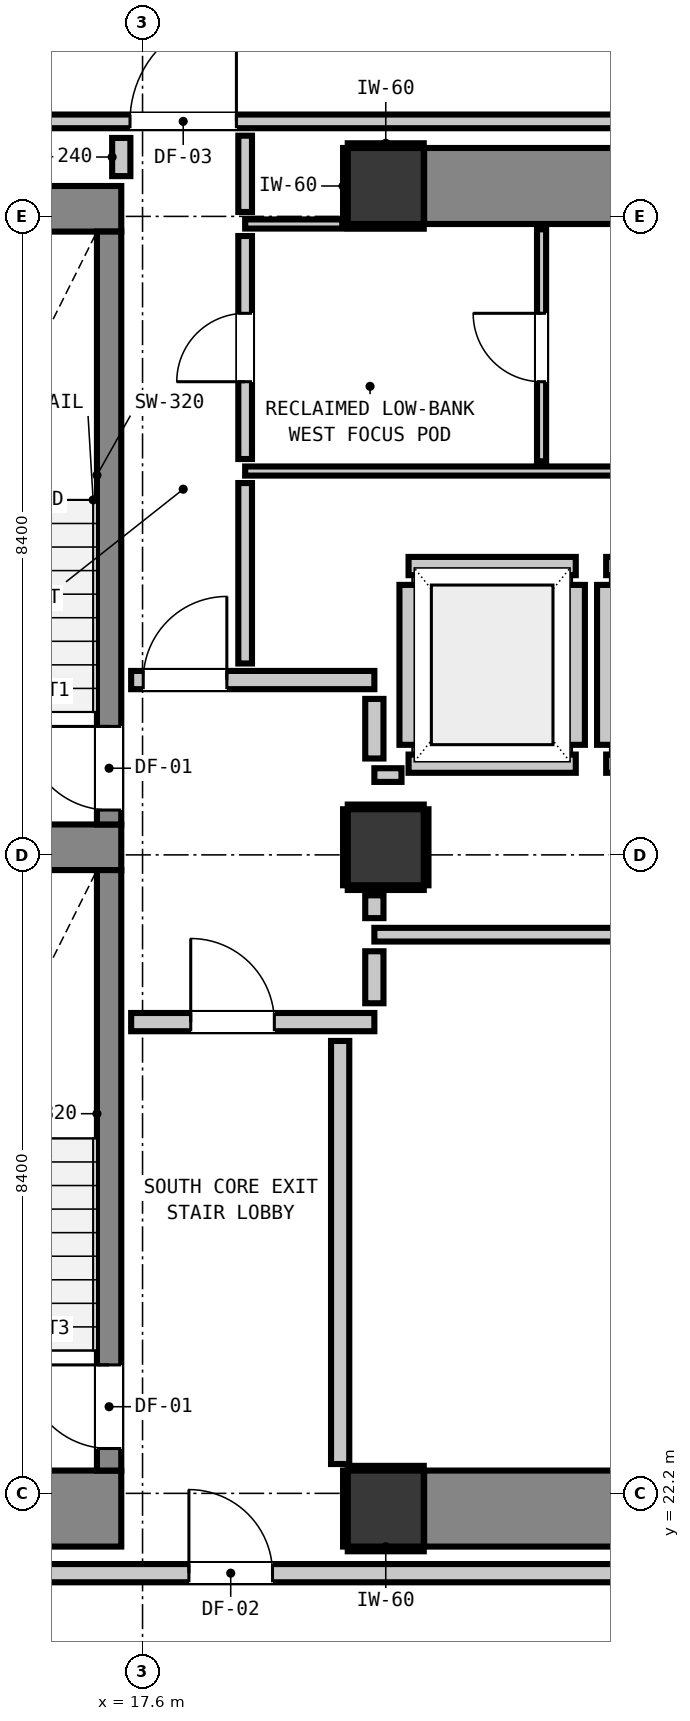
"""IFC4 building model, lengths in metres.
Left out: names, types, materials, properties, quantities, classifications, styles, units other than length and angle.
Written with IfcOpenShell. Run it as: python <this file> out.ifc"""

import sys

from ifc_helpers import new_model, si_unit, direction, frame, frame_2d, origin, origin_2d, place, context, subcontext, project, spatial, rectangle, extrude, element, fill, save


model = new_model("IFC4")
c1 = context("Model", 3, precision=1e-05, world=origin(), true_north=direction((0.0, 1.0)))
c2 = subcontext(c1, "Body", "Model", "MODEL_VIEW")
j1 = project(units=[si_unit("LENGTHUNIT", "METRE"), si_unit("PLANEANGLEUNIT", "RADIAN")], contexts=[c1])
p1 = place(None, origin())
s1 = spatial("IfcSite", under=j1, at=p1, CompositionType="ELEMENT")
p2 = place(p1, origin())
s2 = spatial("IfcBuilding", under=s1, at=p2, CompositionType="ELEMENT")
p3 = place(p2, frame((0.0, 0.0, 155.88)))
s3 = spatial("IfcBuildingStorey", under=s2, at=p3, CompositionType="ELEMENT", Elevation=155.88)
for number, where, z_axis, x_axis in (
    (1, (20.8, 22.0, 0.0), (0.0, 0.0, 1.0), (1.0, 0.0, 0.0)),
    (2, (20.8, 39.4, 0.0), (0.0, 0.0, 1.0), (1.0, 0.0, 0.0)),
):
    element("IfcColumn", number, at=place(p3, frame(where, z_axis=z_axis, x_axis=x_axis)), inside=s3, PredefinedType="COLUMN", context=c2, shape_type="SweptSolid", body=[
        extrude(rectangle(XDim=1.0, YDim=1.0, at=origin_2d()), origin(), (0.0, 0.0, 1.0), 3.32),
    ])
p4 = place(p3, frame((13.24, 22.0, 0.0), z_axis=(0.0, 0.0, 1.0), x_axis=(1.0, 0.0, 0.0)))
e3 = element("IfcWall", 3, at=p4, inside=s3, PredefinedType="SHEAR", context=c2, shape_type="SweptSolid", body=[
    extrude(rectangle(XDim=4.08, YDim=1.0, at=frame_2d((2.04, 0.0))), origin(), (0.0, 0.0, 1.0), 3.32),
])
p5 = place(p3, frame((13.24, 39.1, 0.0), z_axis=(0.0, 0.0, 1.0), x_axis=(1.0, 0.0, 0.0)))
e4 = element("IfcWall", 4, at=p5, inside=s3, PredefinedType="SHEAR", context=c2, shape_type="SweptSolid", body=[
    extrude(rectangle(XDim=4.08, YDim=0.6, at=frame_2d((2.04, 0.0))), origin(), (0.0, 0.0, 1.0), 3.32),
])
p6 = place(p3, frame((13.905, 30.7, 0.0), z_axis=(0.0, 0.0, 1.0), x_axis=(1.0, 0.0, 0.0)))
e5 = element("IfcWall", 5, at=p6, inside=s3, PredefinedType="SHEAR", context=c2, shape_type="SweptSolid", body=[
    extrude(rectangle(XDim=3.415, YDim=0.6, at=frame_2d((1.708, 0.0))), origin(), (0.0, 0.0, 1.0), 3.32),
])
for number, where, z_axis, x_axis in (
    (6, (21.305, 22.0, 0.0), (0.0, 0.0, 1.0), (1.0, 0.0, 0.0)),
    (7, (21.305, 39.4, 0.0), (0.0, 0.0, 1.0), (1.0, 0.0, 0.0)),
):
    element("IfcWall", number, at=place(p3, frame(where, z_axis=z_axis, x_axis=x_axis)), inside=s3, PredefinedType="SHEAR", context=c2, shape_type="SweptSolid", body=[
        extrude(rectangle(XDim=7.39, YDim=1.0, at=frame_2d((3.695, 0.0))), origin(), (0.0, 0.0, 1.0), 3.32),
    ])
p7 = place(p3, frame((17.16, 31.0, 0.0), z_axis=(0.0, 0.0, 1.0), x_axis=(0.0, 1.0, 0.0)))
e8 = element("IfcWall", 8, at=p7, inside=s3, PredefinedType="SHEAR", context=c2, shape_type="SweptSolid", body=[
    extrude(rectangle(XDim=7.8, YDim=0.32, at=frame_2d((3.9, 0.0))), origin(), (0.0, 0.0, 1.0), 3.32),
])
p8 = place(p7, frame((0.19, 0.0, 0.0)))
e9 = element("IfcOpeningElement", 9, at=p8, cuts=e8, PredefinedType="OPENING", context=c2, shape_type="SweptSolid", body=[
    extrude(rectangle(XDim=1.1, YDim=2.15, at=frame_2d((0.55, 1.075))), frame((0.0, 0.17, 0.0), z_axis=(0.0, -1.0, 0.0), x_axis=(1.0, 0.0, 0.0)), (0.0, 0.0, 1.0), 0.34),
])
p9 = place(p3, frame((17.16, 22.5, 0.0), z_axis=(0.0, 0.0, 1.0), x_axis=(0.0, 1.0, 0.0)))
e10 = element("IfcWall", 10, at=p9, inside=s3, PredefinedType="SHEAR", context=c2, shape_type="SweptSolid", body=[
    extrude(rectangle(XDim=7.9, YDim=0.32, at=frame_2d((3.95, 0.0))), origin(), (0.0, 0.0, 1.0), 3.32),
])
p10 = place(p9, frame((0.29, 0.0, 0.0)))
e11 = element("IfcOpeningElement", 11, at=p10, cuts=e10, PredefinedType="OPENING", context=c2, shape_type="SweptSolid", body=[
    extrude(rectangle(XDim=1.1, YDim=2.15, at=frame_2d((0.55, 1.075))), frame((0.0, 0.17, 0.0), z_axis=(0.0, -1.0, 0.0), x_axis=(1.0, 0.0, 0.0)), (0.0, 0.0, 1.0), 0.34),
])
p11 = place(p3, frame((20.8, 30.7, 0.0), z_axis=(0.0, 0.0, 1.0), x_axis=(1.0, 0.0, 0.0)))
e12 = element("IfcColumn", 12, at=p11, inside=s3, PredefinedType="COLUMN", context=c2, shape_type="SweptSolid", body=[
    extrude(rectangle(XDim=1.0, YDim=1.0, at=origin_2d()), origin(), (0.0, 0.0, 1.0), 3.32),
])
for number, where, z_axis, x_axis in (
    (13, (21.1, 31.8, 0.0), (0.0, 0.0, 1.0), (1.0, 0.0, 0.0)),
    (14, (21.1, 34.4, 0.0), (0.0, 0.0, 1.0), (1.0, 0.0, 0.0)),
):
    element("IfcWall", number, at=place(p3, frame(where, z_axis=z_axis, x_axis=x_axis)), inside=s3, PredefinedType="PARTITIONING", context=c2, shape_type="SweptSolid", body=[
        extrude(rectangle(XDim=2.2, YDim=0.24, at=frame_2d((1.1, 0.0))), origin(), (0.0, 0.0, 1.0), 3.08),
    ])
p12 = place(p3, frame((21.1, 32.048, 0.0), z_axis=(0.0, 0.0, 1.0), x_axis=(0.0, 1.0, 0.0)))
e15 = element("IfcWall", 15, at=p12, inside=s3, PredefinedType="PARTITIONING", context=c2, shape_type="SweptSolid", body=[
    extrude(rectangle(XDim=2.104, YDim=0.24, at=frame_2d((1.052, 0.0))), origin(), (0.0, 0.0, 1.0), 2.315),
])
p13 = place(p3, frame((23.3, 32.048, 0.0), z_axis=(0.0, 0.0, 1.0), x_axis=(0.0, 1.0, 0.0)))
e16 = element("IfcWall", 16, at=p13, inside=s3, PredefinedType="PARTITIONING", context=c2, shape_type="SweptSolid", body=[
    extrude(rectangle(XDim=2.104, YDim=0.24, at=frame_2d((1.052, 0.0))), origin(), (0.0, 0.0, 1.0), 3.08),
])
for number, where, z_axis, x_axis in (
    (17, (23.7, 31.8, 0.0), (0.0, 0.0, 1.0), (1.0, 0.0, 0.0)),
    (18, (23.7, 34.4, 0.0), (0.0, 0.0, 1.0), (1.0, 0.0, 0.0)),
):
    element("IfcWall", number, at=place(p3, frame(where, z_axis=z_axis, x_axis=x_axis)), inside=s3, PredefinedType="PARTITIONING", context=c2, shape_type="SweptSolid", body=[
        extrude(rectangle(XDim=2.2, YDim=0.24, at=frame_2d((1.1, 0.0))), origin(), (0.0, 0.0, 1.0), 3.08),
    ])
p14 = place(p3, frame((23.7, 32.048, 0.0), z_axis=(0.0, 0.0, 1.0), x_axis=(0.0, 1.0, 0.0)))
e19 = element("IfcWall", 19, at=p14, inside=s3, PredefinedType="PARTITIONING", context=c2, shape_type="SweptSolid", body=[
    extrude(rectangle(XDim=2.104, YDim=0.24, at=frame_2d((1.052, 0.0))), origin(), (0.0, 0.0, 1.0), 3.08),
])
p15 = place(p3, frame((9.407, 21.15, 0.0), z_axis=(0.0, 0.0, 1.0), x_axis=(1.0, 0.0, 0.0)))
e20 = element("IfcWall", 20, at=p15, inside=s3, PredefinedType="PARTITIONING", context=c2, shape_type="SweptSolid", body=[
    extrude(rectangle(XDim=27.532, YDim=0.24, at=frame_2d((13.766, 0.0))), origin(), (0.0, 0.0, 1.0), 3.08),
])
p16 = place(p15, frame((8.803, 0.0, 0.0)))
e21 = element("IfcOpeningElement", 21, at=p16, cuts=e20, PredefinedType="OPENING", context=c2, shape_type="SweptSolid", body=[
    extrude(rectangle(XDim=1.1, YDim=2.15, at=frame_2d((0.55, 1.075))), frame((0.0, 0.13, 0.0), z_axis=(0.0, -1.0, 0.0), x_axis=(1.0, 0.0, 0.0)), (0.0, 0.0, 1.0), 0.26),
])
p17 = place(p15, frame((1.192, 0.0, 0.0)))
e22 = element("IfcOpeningElement", 22, at=p17, cuts=e20, PredefinedType="OPENING", context=c2, shape_type="SweptSolid", body=[
    extrude(rectangle(XDim=1.4, YDim=2.15, at=frame_2d((0.7, 1.075))), frame((0.0, 0.13, 0.0), z_axis=(0.0, -1.0, 0.0), x_axis=(1.0, 0.0, 0.0)), (0.0, 0.0, 1.0), 0.26),
])
p18 = place(p3, frame((17.45, 28.4, 0.0), z_axis=(0.0, 0.0, 1.0), x_axis=(1.0, 0.0, 0.0)))
e23 = element("IfcWall", 23, at=p18, inside=s3, PredefinedType="PARTITIONING", context=c2, shape_type="SweptSolid", body=[
    extrude(rectangle(XDim=3.2, YDim=0.24, at=frame_2d((1.6, 0.0))), origin(), (0.0, 0.0, 1.0), 3.08),
])
p19 = place(p18, frame((0.784, 0.0, 0.0)))
e24 = element("IfcOpeningElement", 24, at=p19, cuts=e23, PredefinedType="OPENING", context=c2, shape_type="SweptSolid", body=[
    extrude(rectangle(XDim=1.1, YDim=2.15, at=frame_2d((0.55, 1.075))), frame((0.0, 0.13, 0.0), z_axis=(0.0, -1.0, 0.0), x_axis=(1.0, 0.0, 0.0)), (0.0, 0.0, 1.0), 0.26),
])
p20 = place(p3, frame((17.45, 32.9, 0.0), z_axis=(0.0, 0.0, 1.0), x_axis=(1.0, 0.0, 0.0)))
e25 = element("IfcWall", 25, at=p20, inside=s3, PredefinedType="PARTITIONING", context=c2, shape_type="SweptSolid", body=[
    extrude(rectangle(XDim=3.2, YDim=0.24, at=frame_2d((1.6, 0.0))), origin(), (0.0, 0.0, 1.0), 3.08),
])
p21 = place(p20, frame((0.159, 0.0, 0.0)))
e26 = element("IfcOpeningElement", 26, at=p21, cuts=e25, PredefinedType="OPENING", context=c2, shape_type="SweptSolid", body=[
    extrude(rectangle(XDim=1.1, YDim=2.15, at=frame_2d((0.55, 1.075))), frame((0.0, 0.13, 0.0), z_axis=(0.0, -1.0, 0.0), x_axis=(1.0, 0.0, 0.0)), (0.0, 0.0, 1.0), 0.26),
])
p22 = place(p3, frame((20.65, 29.55, 0.0), z_axis=(0.0, 0.0, 1.0), x_axis=(1.0, 0.0, 0.0)))
e27 = element("IfcWall", 27, at=p22, inside=s3, PredefinedType="PARTITIONING", context=c2, shape_type="SweptSolid", body=[
    extrude(rectangle(XDim=9.325, YDim=0.18, at=frame_2d((4.663, 0.0))), origin(), (0.0, 0.0, 1.0), 3.08),
])
p23 = place(p3, frame((20.65, 31.65, 0.0), z_axis=(0.0, 0.0, 1.0), x_axis=(1.0, 0.0, 0.0)))
e28 = element("IfcWall", 28, at=p23, inside=s3, PredefinedType="PARTITIONING", context=c2, shape_type="SweptSolid", body=[
    extrude(rectangle(XDim=0.357, YDim=0.18, at=frame_2d((0.179, 0.0))), origin(), (0.0, 0.0, 1.0), 3.08),
])
p24 = place(p3, frame((9.407, 40.25, 0.0), z_axis=(0.0, 0.0, 1.0), x_axis=(1.0, 0.0, 0.0)))
e29 = element("IfcWall", 29, at=p24, inside=s3, PredefinedType="PARTITIONING", context=c2, shape_type="SweptSolid", body=[
    extrude(rectangle(XDim=39.386, YDim=0.18, at=frame_2d((19.693, 0.0))), origin(), (0.0, 0.0, 1.0), 3.08),
])
p25 = place(p24, frame((8.028, 0.0, 0.0)))
e30 = element("IfcOpeningElement", 30, at=p25, cuts=e29, PredefinedType="OPENING", context=c2, shape_type="SweptSolid", body=[
    extrude(rectangle(XDim=1.4, YDim=2.15, at=frame_2d((0.7, 1.075))), frame((0.0, 0.1, 0.0), z_axis=(0.0, -1.0, 0.0), x_axis=(1.0, 0.0, 0.0)), (0.0, 0.0, 1.0), 0.2),
])
p26 = place(p24, frame((1.192, 0.0, 0.0)))
e31 = element("IfcOpeningElement", 31, at=p26, cuts=e29, PredefinedType="OPENING", context=c2, shape_type="SweptSolid", body=[
    extrude(rectangle(XDim=1.4, YDim=2.15, at=frame_2d((0.7, 1.075))), frame((0.0, 0.1, 0.0), z_axis=(0.0, -1.0, 0.0), x_axis=(1.0, 0.0, 0.0)), (0.0, 0.0, 1.0), 0.2),
])
p27 = place(p24, frame((28.643, 0.0, 0.0)))
e32 = element("IfcOpeningElement", 32, at=p27, cuts=e29, PredefinedType="OPENING", context=c2, shape_type="SweptSolid", body=[
    extrude(rectangle(XDim=1.4, YDim=2.15, at=frame_2d((0.7, 1.075))), frame((0.0, 0.1, 0.0), z_axis=(0.0, -1.0, 0.0), x_axis=(1.0, 0.0, 0.0)), (0.0, 0.0, 1.0), 0.2),
])
p28 = place(p3, frame((18.95, 35.65, 0.0), z_axis=(0.0, 0.0, 1.0), x_axis=(1.0, 0.0, 0.0)))
e33 = element("IfcWall", 33, at=p28, inside=s3, PredefinedType="PARTITIONING", context=c2, shape_type="SweptSolid", body=[
    extrude(rectangle(XDim=11.025, YDim=0.12, at=frame_2d((5.513, 0.0))), origin(), (0.0, 0.0, 1.0), 3.08),
])
p29 = place(p3, frame((18.95, 38.9, 0.0), z_axis=(0.0, 0.0, 1.0), x_axis=(1.0, 0.0, 0.0)))
e34 = element("IfcWall", 34, at=p29, inside=s3, PredefinedType="PARTITIONING", context=c2, shape_type="SweptSolid", body=[
    extrude(rectangle(XDim=1.278, YDim=0.12, at=frame_2d((0.639, 0.0))), origin(), (0.0, 0.0, 1.0), 3.08),
])
p30 = place(p3, frame((17.32, 39.53, 0.0), z_axis=(0.0, 0.0, 1.0), x_axis=(0.0, 1.0, 0.0)))
e35 = element("IfcWall", 35, at=p30, inside=s3, PredefinedType="PARTITIONING", context=c2, shape_type="SweptSolid", body=[
    extrude(rectangle(XDim=0.502, YDim=0.24, at=frame_2d((0.251, 0.0))), origin(), (0.0, 0.0, 1.0), 3.08),
])
p31 = place(p3, frame((20.2, 22.586, 0.0), z_axis=(0.0, 0.0, 1.0), x_axis=(0.0, 1.0, 0.0)))
e36 = element("IfcWall", 36, at=p31, inside=s3, PredefinedType="PARTITIONING", context=c2, shape_type="SweptSolid", body=[
    extrude(rectangle(XDim=5.566, YDim=0.24, at=frame_2d((2.783, 0.0))), origin(), (0.0, 0.0, 1.0), 3.08),
])
p32 = place(p3, frame((20.65, 28.648, 0.0), z_axis=(0.0, 0.0, 1.0), x_axis=(0.0, 1.0, 0.0)))
e37 = element("IfcWall", 37, at=p32, inside=s3, PredefinedType="PARTITIONING", context=c2, shape_type="SweptSolid", body=[
    extrude(rectangle(XDim=0.684, YDim=0.24, at=frame_2d((0.342, 0.0))), origin(), (0.0, 0.0, 1.0), 2.315),
])
p33 = place(p3, frame((20.65, 29.768, 0.0), z_axis=(0.0, 0.0, 1.0), x_axis=(0.0, 1.0, 0.0)))
e38 = element("IfcWall", 38, at=p33, inside=s3, PredefinedType="PARTITIONING", context=c2, shape_type="SweptSolid", body=[
    extrude(rectangle(XDim=0.3, YDim=0.24, at=frame_2d((0.15, 0.0))), origin(), (0.0, 0.0, 1.0), 2.315),
])
p34 = place(p3, frame((20.65, 31.868, 0.0), z_axis=(0.0, 0.0, 1.0), x_axis=(0.0, 1.0, 0.0)))
e39 = element("IfcWall", 39, at=p34, inside=s3, PredefinedType="PARTITIONING", context=c2, shape_type="SweptSolid", body=[
    extrude(rectangle(XDim=0.784, YDim=0.24, at=frame_2d((0.392, 0.0))), origin(), (0.0, 0.0, 1.0), 2.315),
])
p35 = place(p3, frame((18.95, 33.118, 0.0), z_axis=(0.0, 0.0, 1.0), x_axis=(0.0, 1.0, 0.0)))
e40 = element("IfcWall", 40, at=p35, inside=s3, PredefinedType="PARTITIONING", context=c2, shape_type="SweptSolid", body=[
    extrude(rectangle(XDim=2.374, YDim=0.18, at=frame_2d((1.187, 0.0))), origin(), (0.0, 0.0, 1.0), 3.08),
])
p36 = place(p3, frame((18.95, 35.808, 0.0), z_axis=(0.0, 0.0, 1.0), x_axis=(0.0, 1.0, 0.0)))
e41 = element("IfcWall", 41, at=p36, inside=s3, PredefinedType="PARTITIONING", context=c2, shape_type="SweptSolid", body=[
    extrude(rectangle(XDim=2.934, YDim=0.18, at=frame_2d((1.467, 0.0))), origin(), (0.0, 0.0, 1.0), 3.08),
])
p37 = place(p36, frame((1.017, 0.0, 0.0)))
e42 = element("IfcOpeningElement", 42, at=p37, cuts=e41, PredefinedType="OPENING", context=c2, shape_type="SweptSolid", body=[
    extrude(rectangle(XDim=0.9, YDim=2.1, at=frame_2d((0.45, 1.05))), frame((0.0, 0.1, 0.0), z_axis=(0.0, -1.0, 0.0), x_axis=(1.0, 0.0, 0.0)), (0.0, 0.0, 1.0), 0.2),
])
p38 = place(p3, frame((18.95, 39.058, 0.0), z_axis=(0.0, 0.0, 1.0), x_axis=(0.0, 1.0, 0.0)))
e43 = element("IfcWall", 43, at=p38, inside=s3, PredefinedType="PARTITIONING", context=c2, shape_type="SweptSolid", body=[
    extrude(rectangle(XDim=1.004, YDim=0.18, at=frame_2d((0.502, 0.0))), origin(), (0.0, 0.0, 1.0), 3.08),
])
p39 = place(p3, frame((22.85, 35.778, 0.0), z_axis=(0.0, 0.0, 1.0), x_axis=(0.0, 1.0, 0.0)))
e44 = element("IfcWall", 44, at=p39, inside=s3, PredefinedType="PARTITIONING", context=c2, shape_type="SweptSolid", body=[
    extrude(rectangle(XDim=3.052, YDim=0.12, at=frame_2d((1.526, 0.0))), origin(), (0.0, 0.0, 1.0), 3.08),
])
p40 = place(p39, frame((1.047, 0.0, 0.0)))
e45 = element("IfcOpeningElement", 45, at=p40, cuts=e44, PredefinedType="OPENING", context=c2, shape_type="SweptSolid", body=[
    extrude(rectangle(XDim=0.9, YDim=2.1, at=frame_2d((0.45, 1.05))), frame((0.0, 0.07, 0.0), z_axis=(0.0, -1.0, 0.0), x_axis=(1.0, 0.0, 0.0)), (0.0, 0.0, 1.0), 0.14),
])
for number, where, z_axis, x_axis in (
    (46, (20.3, 21.468, 0.0), (0.0, 0.0, 1.0), (1.0, 0.0, 0.0)),
    (47, (20.3, 22.532, 0.0), (0.0, 0.0, 1.0), (1.0, 0.0, 0.0)),
    (48, (20.268, 21.5, 0.0), (0.0, 0.0, 1.0), (0.0, 1.0, 0.0)),
    (49, (20.3, 38.868, 0.0), (0.0, 0.0, 1.0), (1.0, 0.0, 0.0)),
    (50, (20.3, 39.932, 0.0), (0.0, 0.0, 1.0), (1.0, 0.0, 0.0)),
    (51, (20.268, 38.9, 0.0), (0.0, 0.0, 1.0), (0.0, 1.0, 0.0)),
    (52, (20.3, 30.168, 0.0), (0.0, 0.0, 1.0), (1.0, 0.0, 0.0)),
    (53, (20.3, 31.232, 0.0), (0.0, 0.0, 1.0), (1.0, 0.0, 0.0)),
    (54, (20.268, 30.2, 0.0), (0.0, 0.0, 1.0), (0.0, 1.0, 0.0)),
    (55, (21.332, 30.2, 0.0), (0.0, 0.0, 1.0), (0.0, 1.0, 0.0)),
):
    element("IfcWall", number, at=place(p3, frame(where, z_axis=z_axis, x_axis=x_axis)), inside=s3, PredefinedType="PARTITIONING", context=c2, shape_type="SweptSolid", body=[
        extrude(rectangle(XDim=1.0, YDim=0.06, at=frame_2d((0.5, 0.0))), origin(), (0.0, 0.0, 1.0), 1.45),
    ])
p41 = place(p8, origin())
e56 = element("IfcDoor", 56, at=p41, inside=s3, OperationType="SINGLE_SWING_RIGHT", PredefinedType="DOOR", context=c2, shape_type="SweptSolid", body=[
    extrude(rectangle(XDim=1.1, YDim=2.15, at=frame_2d((0.55, 1.075))), frame((0.0, 0.025, 0.0), z_axis=(0.0, -1.0, 0.0), x_axis=(1.0, 0.0, 0.0)), (0.0, 0.0, 1.0), 0.05),
])
fill(e9, e56)
p42 = place(p10, origin())
e57 = element("IfcDoor", 57, at=p42, inside=s3, OperationType="SINGLE_SWING_RIGHT", PredefinedType="DOOR", context=c2, shape_type="SweptSolid", body=[
    extrude(rectangle(XDim=1.1, YDim=2.15, at=frame_2d((0.55, 1.075))), frame((0.0, 0.025, 0.0), z_axis=(0.0, -1.0, 0.0), x_axis=(1.0, 0.0, 0.0)), (0.0, 0.0, 1.0), 0.05),
])
fill(e11, e57)
p43 = place(p19, origin())
e58 = element("IfcDoor", 58, at=p43, inside=s3, OperationType="SINGLE_SWING_LEFT", PredefinedType="DOOR", context=c2, shape_type="SweptSolid", body=[
    extrude(rectangle(XDim=1.1, YDim=2.15, at=frame_2d((0.55, 1.075))), frame((0.0, 0.025, 0.0), z_axis=(0.0, -1.0, 0.0), x_axis=(1.0, 0.0, 0.0)), (0.0, 0.0, 1.0), 0.05),
])
fill(e24, e58)
p44 = place(p21, origin())
e59 = element("IfcDoor", 59, at=p44, inside=s3, OperationType="SINGLE_SWING_RIGHT", PredefinedType="DOOR", context=c2, shape_type="SweptSolid", body=[
    extrude(rectangle(XDim=1.1, YDim=2.15, at=frame_2d((0.55, 1.075))), frame((0.0, 0.025, 0.0), z_axis=(0.0, -1.0, 0.0), x_axis=(1.0, 0.0, 0.0)), (0.0, 0.0, 1.0), 0.05),
])
fill(e26, e59)
p45 = place(p16, origin())
e60 = element("IfcDoor", 60, at=p45, inside=s3, OperationType="SINGLE_SWING_LEFT", PredefinedType="DOOR", context=c2, shape_type="SweptSolid", body=[
    extrude(rectangle(XDim=1.1, YDim=2.15, at=frame_2d((0.55, 1.075))), frame((0.0, 0.025, 0.0), z_axis=(0.0, -1.0, 0.0), x_axis=(1.0, 0.0, 0.0)), (0.0, 0.0, 1.0), 0.05),
])
fill(e21, e60)
p46 = place(p25, origin())
e61 = element("IfcDoor", 61, at=p46, inside=s3, OperationType="SINGLE_SWING_RIGHT", PredefinedType="DOOR", context=c2, shape_type="SweptSolid", body=[
    extrude(rectangle(XDim=1.4, YDim=2.15, at=frame_2d((0.7, 1.075))), frame((0.0, 0.025, 0.0), z_axis=(0.0, -1.0, 0.0), x_axis=(1.0, 0.0, 0.0)), (0.0, 0.0, 1.0), 0.05),
])
fill(e30, e61)
p47 = place(p37, origin())
e62 = element("IfcDoor", 62, at=p47, inside=s3, OperationType="SINGLE_SWING_LEFT", PredefinedType="DOOR", context=c2, shape_type="SweptSolid", body=[
    extrude(rectangle(XDim=0.9, YDim=2.1, at=frame_2d((0.45, 1.05))), frame((0.0, 0.025, 0.0), z_axis=(0.0, -1.0, 0.0), x_axis=(1.0, 0.0, 0.0)), (0.0, 0.0, 1.0), 0.05),
])
fill(e42, e62)
p48 = place(p40, origin())
e63 = element("IfcDoor", 63, at=p48, inside=s3, OperationType="SINGLE_SWING_RIGHT", PredefinedType="DOOR", context=c2, shape_type="SweptSolid", body=[
    extrude(rectangle(XDim=0.9, YDim=2.1, at=frame_2d((0.45, 1.05))), frame((0.0, 0.025, 0.0), z_axis=(0.0, -1.0, 0.0), x_axis=(1.0, 0.0, 0.0)), (0.0, 0.0, 1.0), 0.05),
])
fill(e45, e63)
save(model, sys.argv[1])
